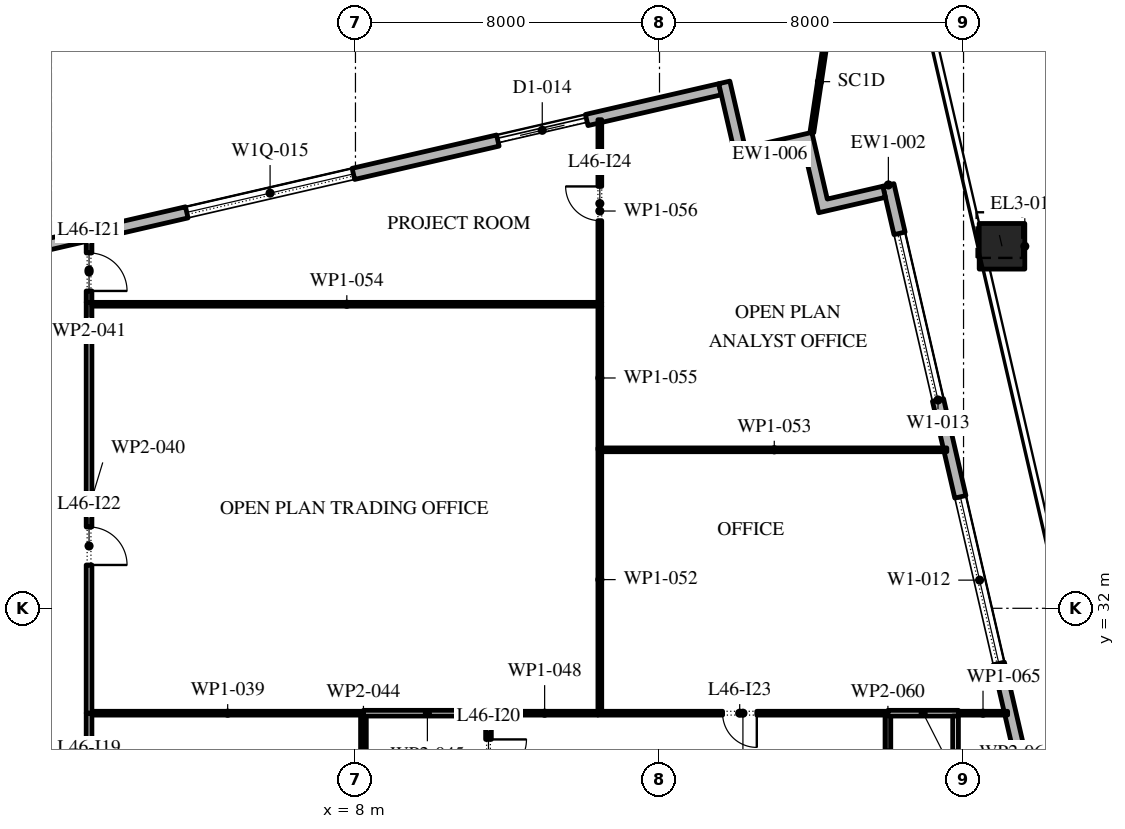
"""IFC4 building model, lengths in metres.
Left out: names, types, materials, properties, quantities, classifications, styles, units other than length and angle.
Written with IfcOpenShell. Run it as: python <this file> out.ifc"""

import sys

from ifc_helpers import new_model, si_unit, direction, frame, frame_2d, origin, origin_2d, place, context, subcontext, project, spatial, polyline, rectangle, outline, extrude, element, fill, save


model = new_model("IFC4")
c1 = context("Model", 3, precision=1e-05, world=origin(), true_north=direction((0.0, 1.0)))
c2 = subcontext(c1, "Body", "Model", "MODEL_VIEW")
j1 = project(units=[si_unit("LENGTHUNIT", "METRE"), si_unit("PLANEANGLEUNIT", "RADIAN")], contexts=[c1])
p1 = place(None, origin())
s1 = spatial("IfcSite", under=j1, at=p1, CompositionType="ELEMENT")
p2 = place(p1, origin())
s2 = spatial("IfcBuilding", under=s1, at=p2, CompositionType="ELEMENT")
p3 = place(p2, frame((0.0, 0.0, 209.4)))
s3 = spatial("IfcBuildingStorey", under=s2, at=p3, CompositionType="ELEMENT", Elevation=209.4)
p4 = place(p3, frame((26.885, 33.413, 0.0), z_axis=(-0.013519031249, 0.058369722905, 0.9982034919), x_axis=(-0.974211350104, -0.225637420054, 0.0)))
e1 = element("IfcColumn", 1, at=p4, inside=s3, PredefinedType="COLUMN", context=c2, shape_type="SweptSolid", body=[
    extrude(rectangle(XDim=1.2, YDim=1.2, at=origin_2d()), origin(), (0.0, 0.0, 1.0), 4.208),
])
p5 = place(p3, frame((25.012, 41.525, 0.0), z_axis=(-0.016175211706, 0.07003460839, 0.99741341286), x_axis=(-0.97435039746, -0.225036225904, 0.0)))
e2 = element("IfcColumn", 2, at=p5, inside=s3, PredefinedType="COLUMN", context=c2, shape_type="SweptSolid", body=[
    extrude(rectangle(XDim=1.2, YDim=1.2, at=origin_2d()), origin(), (0.0, 0.0, 1.0), 4.211),
])
p6 = place(p3, frame((33.157, -5.092, 0.0), z_axis=(0.0, 0.0, 1.0), x_axis=(-0.224950279389, 0.974370243697, 0.0)))
e3 = element("IfcWall", 3, at=p6, inside=s3, PredefinedType="STANDARD", context=c2, shape_type="SweptSolid", body=[
    extrude(rectangle(XDim=49.5, YDim=0.3, at=frame_2d((24.75, 0.0))), origin(), (0.0, 0.0, 1.0), 4.0),
])
p7 = place(p6, frame((2.207, 0.0, 0.0)))
e4 = element("IfcOpeningElement", 4, at=p7, cuts=e3, PredefinedType="OPENING", context=c2, shape_type="SweptSolid", body=[
    extrude(rectangle(XDim=2.4, YDim=3.125, at=frame_2d((1.2, 1.562))), frame((0.0, 0.16, 0.0), z_axis=(0.0, -1.0, 0.0), x_axis=(1.0, 0.0, 0.0)), (0.0, 0.0, 1.0), 0.32),
])
p8 = place(p6, frame((8.121, 0.0, 0.45)))
e5 = element("IfcOpeningElement", 5, at=p8, cuts=e3, PredefinedType="OPENING", context=c2, shape_type="SweptSolid", body=[
    extrude(rectangle(XDim=4.5, YDim=2.875, at=frame_2d((2.25, 1.438))), frame((0.0, 0.16, 0.0), z_axis=(0.0, -1.0, 0.0), x_axis=(1.0, 0.0, 0.0)), (0.0, 0.0, 1.0), 0.32),
])
p9 = place(p6, frame((15.236, 0.0, 0.45)))
e6 = element("IfcOpeningElement", 6, at=p9, cuts=e3, PredefinedType="OPENING", context=c2, shape_type="SweptSolid", body=[
    extrude(rectangle(XDim=4.5, YDim=2.875, at=frame_2d((2.25, 1.438))), frame((0.0, 0.16, 0.0), z_axis=(0.0, -1.0, 0.0), x_axis=(1.0, 0.0, 0.0)), (0.0, 0.0, 1.0), 0.32),
])
p10 = place(p6, frame((22.35, 0.0, 0.45)))
e7 = element("IfcOpeningElement", 7, at=p10, cuts=e3, PredefinedType="OPENING", context=c2, shape_type="SweptSolid", body=[
    extrude(rectangle(XDim=4.5, YDim=3.0, at=frame_2d((2.25, 1.5))), frame((0.0, 0.16, 0.0), z_axis=(0.0, -1.0, 0.0), x_axis=(1.0, 0.0, 0.0)), (0.0, 0.0, 1.0), 0.32),
])
p11 = place(p6, frame((30.514, 0.0, 0.0)))
e8 = element("IfcOpeningElement", 8, at=p11, cuts=e3, PredefinedType="OPENING", context=c2, shape_type="SweptSolid", body=[
    extrude(rectangle(XDim=2.4, YDim=3.45, at=frame_2d((1.2, 1.725))), frame((0.0, 0.16, 0.0), z_axis=(0.0, -1.0, 0.0), x_axis=(1.0, 0.0, 0.0)), (0.0, 0.0, 1.0), 0.32),
])
p12 = place(p6, frame((36.579, 0.0, 0.45)))
e9 = element("IfcOpeningElement", 9, at=p12, cuts=e3, PredefinedType="OPENING", context=c2, shape_type="SweptSolid", body=[
    extrude(rectangle(XDim=4.5, YDim=3.05, at=frame_2d((2.25, 1.525))), frame((0.0, 0.16, 0.0), z_axis=(0.0, -1.0, 0.0), x_axis=(1.0, 0.0, 0.0)), (0.0, 0.0, 1.0), 0.32),
])
p13 = place(p6, frame((43.693, 0.0, 0.45)))
e10 = element("IfcOpeningElement", 10, at=p13, cuts=e3, PredefinedType="OPENING", context=c2, shape_type="SweptSolid", body=[
    extrude(rectangle(XDim=4.5, YDim=3.05, at=frame_2d((2.25, 1.525))), frame((0.0, 0.16, 0.0), z_axis=(0.0, -1.0, 0.0), x_axis=(1.0, 0.0, 0.0)), (0.0, 0.0, 1.0), 0.32),
])
p14 = place(p3, frame((17.592, 45.657, 0.0), z_axis=(0.0, 0.0, 1.0), x_axis=(-0.974370243697, -0.224950279389, 0.0)))
e11 = element("IfcWall", 11, at=p14, inside=s3, PredefinedType="STANDARD", context=c2, shape_type="SweptSolid", body=[
    extrude(rectangle(XDim=49.5, YDim=0.3, at=frame_2d((24.75, 0.0))), origin(), (0.0, 0.0, 1.0), 4.0),
])
p15 = place(p14, frame((3.6, 0.0, 0.0)))
e12 = element("IfcOpeningElement", 12, at=p15, cuts=e11, PredefinedType="OPENING", context=c2, shape_type="SweptSolid", body=[
    extrude(rectangle(XDim=2.4, YDim=3.5, at=frame_2d((1.2, 1.75))), frame((0.0, 0.16, 0.0), z_axis=(0.0, -1.0, 0.0), x_axis=(1.0, 0.0, 0.0)), (0.0, 0.0, 1.0), 0.32),
])
p16 = place(p14, frame((9.9, 0.0, 0.45)))
e13 = element("IfcOpeningElement", 13, at=p16, cuts=e11, PredefinedType="OPENING", context=c2, shape_type="SweptSolid", body=[
    extrude(rectangle(XDim=4.5, YDim=2.45, at=frame_2d((2.25, 1.225))), frame((0.0, 0.16, 0.0), z_axis=(0.0, -1.0, 0.0), x_axis=(1.0, 0.0, 0.0)), (0.0, 0.0, 1.0), 0.32),
])
p17 = place(p14, frame((18.2, 0.0, 0.45)))
e14 = element("IfcOpeningElement", 14, at=p17, cuts=e11, PredefinedType="OPENING", context=c2, shape_type="SweptSolid", body=[
    extrude(rectangle(XDim=4.5, YDim=2.45, at=frame_2d((2.25, 1.225))), frame((0.0, 0.16, 0.0), z_axis=(0.0, -1.0, 0.0), x_axis=(1.0, 0.0, 0.0)), (0.0, 0.0, 1.0), 0.32),
])
p18 = place(p14, frame((26.5, 0.0, 0.45)))
e15 = element("IfcOpeningElement", 15, at=p18, cuts=e11, PredefinedType="OPENING", context=c2, shape_type="SweptSolid", body=[
    extrude(rectangle(XDim=4.5, YDim=2.45, at=frame_2d((2.25, 1.225))), frame((0.0, 0.16, 0.0), z_axis=(0.0, -1.0, 0.0), x_axis=(1.0, 0.0, 0.0)), (0.0, 0.0, 1.0), 0.32),
])
p19 = place(p14, frame((35.85, 0.0, 0.0)))
e16 = element("IfcOpeningElement", 16, at=p19, cuts=e11, PredefinedType="OPENING", context=c2, shape_type="SweptSolid", body=[
    extrude(rectangle(XDim=2.4, YDim=3.5, at=frame_2d((1.2, 1.75))), frame((0.0, 0.16, 0.0), z_axis=(0.0, -1.0, 0.0), x_axis=(1.0, 0.0, 0.0)), (0.0, 0.0, 1.0), 0.32),
])
p20 = place(p14, frame((43.1, 0.0, 0.45)))
e17 = element("IfcOpeningElement", 17, at=p20, cuts=e11, PredefinedType="OPENING", context=c2, shape_type="SweptSolid", body=[
    extrude(rectangle(XDim=4.5, YDim=2.575, at=frame_2d((2.25, 1.288))), frame((0.0, 0.16, 0.0), z_axis=(0.0, -1.0, 0.0), x_axis=(1.0, 0.0, 0.0)), (0.0, 0.0, 1.0), 0.32),
])
p21 = place(p3, origin())
e18 = element("IfcWall", 18, at=p21, inside=s3, PredefinedType="STANDARD", context=c2, shape_type="SweptSolid", body=[
    extrude(outline(polyline([(19.785, 44.162), (18.031, 43.757), (17.558, 45.803), (17.851, 45.871), (18.256, 44.117), (20.01, 44.522), (20.414, 42.768), (21.876, 43.105), (21.943, 42.813), (20.19, 42.408), (19.785, 44.162)])), origin(), (0.0, 0.0, 1.0), 4.0),
])
p22 = place(p3, frame((20.01, 44.522, -0.05), z_axis=(0.0, 0.0, 1.0), x_axis=(0.148468674811, 0.988917111087, 0.0)))
e19 = element("IfcWall", 19, at=p22, inside=s3, PredefinedType="STANDARD", context=c2, shape_type="SweptSolid", body=[
    extrude(rectangle(XDim=2.7, YDim=0.1, at=frame_2d((1.35, 0.0))), origin(), (0.0, 0.0, 1.0), 3.07),
])
p23 = place(p3, frame((0.99, 29.24, 0.0), z_axis=(0.0, 0.0, 1.0), x_axis=(0.0, -1.0, 0.0)))
e20 = element("IfcWall", 20, at=p23, inside=s3, PredefinedType="PARTITIONING", context=c2, shape_type="SweptSolid", body=[
    extrude(rectangle(XDim=6.93, YDim=0.15, at=frame_2d((3.465, 0.0))), origin(), (0.0, 0.0, 1.0), 4.0),
])
p24 = place(p23, frame((1.53, 0.0, 0.0)))
e21 = element("IfcOpeningElement", 21, at=p24, cuts=e20, PredefinedType="OPENING", context=c2, shape_type="SweptSolid", body=[
    extrude(rectangle(XDim=1.0, YDim=2.1, at=frame_2d((0.5, 1.05))), frame((0.0, 0.085, 0.0), z_axis=(0.0, -1.0, 0.0), x_axis=(1.0, 0.0, 0.0)), (0.0, 0.0, 1.0), 0.17),
])
p25 = place(p3, frame((1.065, 29.24, 0.0), z_axis=(0.0, 0.0, 1.0), x_axis=(1.0, 0.0, 0.0)))
e22 = element("IfcWall", 22, at=p25, inside=s3, PredefinedType="PARTITIONING", context=c2, shape_type="SweptSolid", body=[
    extrude(rectangle(XDim=7.145, YDim=0.1, at=frame_2d((3.573, 0.0))), origin(), (0.0, 0.0, 1.0), 4.0),
])
p26 = place(p3, frame((0.99, 40.05, 0.0), z_axis=(0.0, 0.0, 1.0), x_axis=(0.0, -1.0, 0.0)))
e23 = element("IfcWall", 23, at=p26, inside=s3, PredefinedType="PARTITIONING", context=c2, shape_type="SweptSolid", body=[
    extrude(rectangle(XDim=10.81, YDim=0.15, at=frame_2d((5.405, 0.0))), origin(), (0.0, 0.0, 1.0), 4.0),
])
p27 = place(p26, frame((5.91, 0.0, 0.0)))
e24 = element("IfcOpeningElement", 24, at=p27, cuts=e23, PredefinedType="OPENING", context=c2, shape_type="SweptSolid", body=[
    extrude(rectangle(XDim=1.0, YDim=2.1, at=frame_2d((0.5, 1.05))), frame((0.0, 0.085, 0.0), z_axis=(0.0, -1.0, 0.0), x_axis=(1.0, 0.0, 0.0)), (0.0, 0.0, 1.0), 0.17),
])
p28 = place(p3, frame((0.99, 41.753, 0.0), z_axis=(0.0, 0.0, 1.0), x_axis=(0.0, -1.0, 0.0)))
e25 = element("IfcWall", 25, at=p28, inside=s3, PredefinedType="PARTITIONING", context=c2, shape_type="SweptSolid", body=[
    extrude(rectangle(XDim=1.703, YDim=0.15, at=frame_2d((0.852, 0.0))), origin(), (0.0, 0.0, 1.0), 4.0),
])
p29 = place(p28, frame((0.403, 0.0, 0.0)))
e26 = element("IfcOpeningElement", 26, at=p29, cuts=e25, PredefinedType="OPENING", context=c2, shape_type="SweptSolid", body=[
    extrude(rectangle(XDim=1.0, YDim=2.1, at=frame_2d((0.5, 1.05))), frame((0.0, 0.085, 0.0), z_axis=(0.0, -1.0, 0.0), x_axis=(1.0, 0.0, 0.0)), (0.0, 0.0, 1.0), 0.17),
])
p30 = place(p3, frame((8.21, 27.2, 0.0), z_axis=(0.0, 0.0, 1.0), x_axis=(0.0, 1.0, 0.0)))
e27 = element("IfcWall", 27, at=p30, inside=s3, PredefinedType="PARTITIONING", context=c2, shape_type="SweptSolid", body=[
    extrude(rectangle(XDim=1.99, YDim=0.15, at=frame_2d((0.995, 0.0))), origin(), (0.0, 0.0, 1.0), 4.0),
])
p31 = place(p3, frame((8.21, 29.24, 0.0), z_axis=(0.0, 0.0, 1.0), x_axis=(1.0, 0.0, 0.0)))
e28 = element("IfcWall", 28, at=p31, inside=s3, PredefinedType="PARTITIONING", context=c2, shape_type="SweptSolid", body=[
    extrude(rectangle(XDim=3.365, YDim=0.15, at=frame_2d((1.683, 0.0))), origin(), (0.0, 0.0, 1.0), 4.0),
])
p32 = place(p3, frame((11.5, 29.165, 0.0), z_axis=(0.0, 0.0, 1.0), x_axis=(0.0, -1.0, 0.0)))
e29 = element("IfcWall", 29, at=p32, inside=s3, PredefinedType="PARTITIONING", context=c2, shape_type="SweptSolid", body=[
    extrude(rectangle(XDim=3.765, YDim=0.15, at=frame_2d((1.883, 0.0))), origin(), (0.0, 0.0, 1.0), 4.0),
])
p33 = place(p32, frame((0.615, 0.0, 0.0)))
e30 = element("IfcOpeningElement", 30, at=p33, cuts=e29, PredefinedType="OPENING", context=c2, shape_type="SweptSolid", body=[
    extrude(rectangle(XDim=1.0, YDim=2.1, at=frame_2d((0.5, 1.05))), frame((0.0, 0.085, 0.0), z_axis=(0.0, -1.0, 0.0), x_axis=(1.0, 0.0, 0.0)), (0.0, 0.0, 1.0), 0.17),
])
p34 = place(p3, frame((11.575, 29.24, 0.0), z_axis=(0.0, 0.0, 1.0), x_axis=(1.0, 0.0, 0.0)))
e31 = element("IfcWall", 31, at=p34, inside=s3, PredefinedType="PARTITIONING", context=c2, shape_type="SweptSolid", body=[
    extrude(rectangle(XDim=2.805, YDim=0.1, at=frame_2d((1.402, 0.0))), origin(), (0.0, 0.0, 1.0), 4.0),
])
p35 = place(p3, frame((14.38, 29.24, 0.0), z_axis=(0.0, 0.0, 1.0), x_axis=(1.0, 0.0, 0.0)))
e32 = element("IfcWall", 32, at=p35, inside=s3, PredefinedType="PARTITIONING", context=c2, shape_type="SweptSolid", body=[
    extrude(rectangle(XDim=7.63, YDim=0.1, at=frame_2d((3.815, 0.0))), origin(), (0.0, 0.0, 1.0), 4.0),
])
p36 = place(p35, frame((3.28, 0.0, 0.0)))
e33 = element("IfcOpeningElement", 33, at=p36, cuts=e32, PredefinedType="OPENING", context=c2, shape_type="SweptSolid", body=[
    extrude(rectangle(XDim=0.9, YDim=2.1, at=frame_2d((0.45, 1.05))), frame((0.0, 0.06, 0.0), z_axis=(0.0, -1.0, 0.0), x_axis=(1.0, 0.0, 0.0)), (0.0, 0.0, 1.0), 0.12),
])
p37 = place(p3, frame((14.43, 36.22, 0.0), z_axis=(0.0, 0.0, 1.0), x_axis=(0.0, -1.0, 0.0)))
e34 = element("IfcWall", 34, at=p37, inside=s3, PredefinedType="PARTITIONING", context=c2, shape_type="SweptSolid", body=[
    extrude(rectangle(XDim=6.93, YDim=0.1, at=frame_2d((3.465, 0.0))), origin(), (0.0, 0.0, 1.0), 4.0),
])
p38 = place(p3, frame((14.48, 36.17, 0.0), z_axis=(0.0, 0.0, 1.0), x_axis=(1.0, 0.0, 0.0)))
e35 = element("IfcWall", 35, at=p38, inside=s3, PredefinedType="PARTITIONING", context=c2, shape_type="SweptSolid", body=[
    extrude(rectangle(XDim=9.08, YDim=0.1, at=frame_2d((4.54, 0.0))), origin(), (0.0, 0.0, 1.0), 4.0),
])
p39 = place(p3, frame((14.48, 40.0, 0.0), z_axis=(0.0, 0.0, 1.0), x_axis=(-1.0, 0.0, 0.0)))
e36 = element("IfcWall", 36, at=p39, inside=s3, PredefinedType="PARTITIONING", context=c2, shape_type="SweptSolid", body=[
    extrude(rectangle(XDim=13.415, YDim=0.1, at=frame_2d((6.708, 0.0))), origin(), (0.0, 0.0, 1.0), 4.0),
])
p40 = place(p3, frame((14.43, 39.95, 0.0), z_axis=(0.0, 0.0, 1.0), x_axis=(0.0, -1.0, 0.0)))
e37 = element("IfcWall", 37, at=p40, inside=s3, PredefinedType="PARTITIONING", context=c2, shape_type="SweptSolid", body=[
    extrude(rectangle(XDim=3.78, YDim=0.1, at=frame_2d((1.89, 0.0))), origin(), (0.0, 0.0, 1.0), 4.0),
])
p41 = place(p3, frame((14.43, 44.856, 0.0), z_axis=(0.0, 0.0, 1.0), x_axis=(0.0, -1.0, 0.0)))
e38 = element("IfcWall", 38, at=p41, inside=s3, PredefinedType="PARTITIONING", context=c2, shape_type="SweptSolid", body=[
    extrude(rectangle(XDim=4.806, YDim=0.1, at=frame_2d((2.403, 0.0))), origin(), (0.0, 0.0, 1.0), 4.0),
])
p42 = place(p41, frame((1.756, 0.0, 0.0)))
e39 = element("IfcOpeningElement", 39, at=p42, cuts=e38, PredefinedType="OPENING", context=c2, shape_type="SweptSolid", body=[
    extrude(rectangle(XDim=0.9, YDim=2.1, at=frame_2d((0.45, 1.05))), frame((0.0, 0.06, 0.0), z_axis=(0.0, -1.0, 0.0), x_axis=(1.0, 0.0, 0.0)), (0.0, 0.0, 1.0), 0.12),
])
p43 = place(p3, frame((22.01, 27.2, 0.0), z_axis=(0.0, 0.0, 1.0), x_axis=(0.0, 1.0, 0.0)))
e40 = element("IfcWall", 40, at=p43, inside=s3, PredefinedType="PARTITIONING", context=c2, shape_type="SweptSolid", body=[
    extrude(rectangle(XDim=1.99, YDim=0.15, at=frame_2d((0.995, 0.0))), origin(), (0.0, 0.0, 1.0), 4.0),
])
p44 = place(p3, frame((22.01, 29.24, 0.0), z_axis=(0.0, 0.0, 1.0), x_axis=(1.0, 0.0, 0.0)))
e41 = element("IfcWall", 41, at=p44, inside=s3, PredefinedType="PARTITIONING", context=c2, shape_type="SweptSolid", body=[
    extrude(rectangle(XDim=1.855, YDim=0.15, at=frame_2d((0.927, 0.0))), origin(), (0.0, 0.0, 1.0), 4.0),
])
p45 = place(p3, frame((23.79, 29.165, 0.0), z_axis=(0.0, 0.0, 1.0), x_axis=(0.0, -1.0, 0.0)))
e42 = element("IfcWall", 42, at=p45, inside=s3, PredefinedType="PARTITIONING", context=c2, shape_type="SweptSolid", body=[
    extrude(rectangle(XDim=1.965, YDim=0.15, at=frame_2d((0.982, 0.0))), origin(), (0.0, 0.0, 1.0), 4.0),
])
p46 = place(p3, frame((23.865, 29.24, 0.0), z_axis=(0.0, 0.0, 1.0), x_axis=(1.0, 0.0, 0.0)))
e43 = element("IfcWall", 43, at=p46, inside=s3, PredefinedType="PARTITIONING", context=c2, shape_type="SweptSolid", body=[
    extrude(rectangle(XDim=1.295, YDim=0.1, at=frame_2d((0.647, 0.0))), origin(), (0.0, 0.0, 1.0), 4.0),
])
p47 = place(p12, origin())
e44 = element("IfcWindow", 44, at=p47, inside=s3, PartitioningType="DOUBLE_PANEL_VERTICAL", PredefinedType="WINDOW", context=c2, shape_type="SweptSolid", body=[
    extrude(rectangle(XDim=4.5, YDim=3.05, at=frame_2d((2.25, 1.525))), frame((0.0, 0.03, 0.0), z_axis=(0.0, -1.0, 0.0), x_axis=(1.0, 0.0, 0.0)), (0.0, 0.0, 1.0), 0.06),
])
fill(e9, e44)
p48 = place(p13, origin())
e45 = element("IfcWindow", 45, at=p48, inside=s3, PartitioningType="DOUBLE_PANEL_VERTICAL", PredefinedType="WINDOW", context=c2, shape_type="SweptSolid", body=[
    extrude(rectangle(XDim=4.5, YDim=3.05, at=frame_2d((2.25, 1.525))), frame((0.0, 0.03, 0.0), z_axis=(0.0, -1.0, 0.0), x_axis=(1.0, 0.0, 0.0)), (0.0, 0.0, 1.0), 0.06),
])
fill(e10, e45)
p49 = place(p15, origin())
e46 = element("IfcDoor", 46, at=p49, inside=s3, OperationType="DOUBLE_DOOR_SLIDING", PredefinedType="DOOR", context=c2, shape_type="SweptSolid", body=[
    extrude(rectangle(XDim=2.4, YDim=3.5, at=frame_2d((1.2, 1.75))), frame((0.0, 0.025, 0.0), z_axis=(0.0, -1.0, 0.0), x_axis=(1.0, 0.0, 0.0)), (0.0, 0.0, 1.0), 0.05),
])
fill(e12, e46)
p50 = place(p16, origin())
e47 = element("IfcWindow", 47, at=p50, inside=s3, PartitioningType="DOUBLE_PANEL_VERTICAL", PredefinedType="WINDOW", context=c2, shape_type="SweptSolid", body=[
    extrude(rectangle(XDim=4.5, YDim=2.45, at=frame_2d((2.25, 1.225))), frame((0.0, 0.03, 0.0), z_axis=(0.0, -1.0, 0.0), x_axis=(1.0, 0.0, 0.0)), (0.0, 0.0, 1.0), 0.06),
])
fill(e13, e47)
p51 = place(p33, origin())
e48 = element("IfcDoor", 48, at=p51, inside=s3, OperationType="SINGLE_SWING_RIGHT", PredefinedType="DOOR", context=c2, shape_type="SweptSolid", body=[
    extrude(rectangle(XDim=1.0, YDim=2.1, at=frame_2d((0.5, 1.05))), frame((0.0, 0.025, 0.0), z_axis=(0.0, -1.0, 0.0), x_axis=(1.0, 0.0, 0.0)), (0.0, 0.0, 1.0), 0.05),
])
fill(e30, e48)
p52 = place(p29, origin())
e49 = element("IfcDoor", 49, at=p52, inside=s3, OperationType="SINGLE_SWING_LEFT", PredefinedType="DOOR", context=c2, shape_type="SweptSolid", body=[
    extrude(rectangle(XDim=1.0, YDim=2.1, at=frame_2d((0.5, 1.05))), frame((0.0, 0.025, 0.0), z_axis=(0.0, -1.0, 0.0), x_axis=(1.0, 0.0, 0.0)), (0.0, 0.0, 1.0), 0.05),
])
fill(e26, e49)
p53 = place(p27, origin())
e50 = element("IfcDoor", 50, at=p53, inside=s3, OperationType="SINGLE_SWING_LEFT", PredefinedType="DOOR", context=c2, shape_type="SweptSolid", body=[
    extrude(rectangle(XDim=1.0, YDim=2.1, at=frame_2d((0.5, 1.05))), frame((0.0, 0.025, 0.0), z_axis=(0.0, -1.0, 0.0), x_axis=(1.0, 0.0, 0.0)), (0.0, 0.0, 1.0), 0.05),
])
fill(e24, e50)
p54 = place(p36, frame((0.9, 0.0, 0.0), z_axis=(0.0, 0.0, 1.0), x_axis=(-1.0, 0.0, 0.0)))
e51 = element("IfcDoor", 51, at=p54, inside=s3, OperationType="SINGLE_SWING_RIGHT", PredefinedType="DOOR", context=c2, shape_type="SweptSolid", body=[
    extrude(rectangle(XDim=0.9, YDim=2.1, at=frame_2d((0.45, 1.05))), frame((0.0, 0.025, 0.0), z_axis=(0.0, -1.0, 0.0), x_axis=(1.0, 0.0, 0.0)), (0.0, 0.0, 1.0), 0.05),
])
fill(e33, e51)
p55 = place(p42, frame((0.9, 0.0, 0.0), z_axis=(0.0, 0.0, 1.0), x_axis=(-1.0, 0.0, 0.0)))
e52 = element("IfcDoor", 52, at=p55, inside=s3, OperationType="SINGLE_SWING_LEFT", PredefinedType="DOOR", context=c2, shape_type="SweptSolid", body=[
    extrude(rectangle(XDim=0.9, YDim=2.1, at=frame_2d((0.45, 1.05))), frame((0.0, 0.025, 0.0), z_axis=(0.0, -1.0, 0.0), x_axis=(1.0, 0.0, 0.0)), (0.0, 0.0, 1.0), 0.05),
])
fill(e39, e52)
save(model, sys.argv[1])
